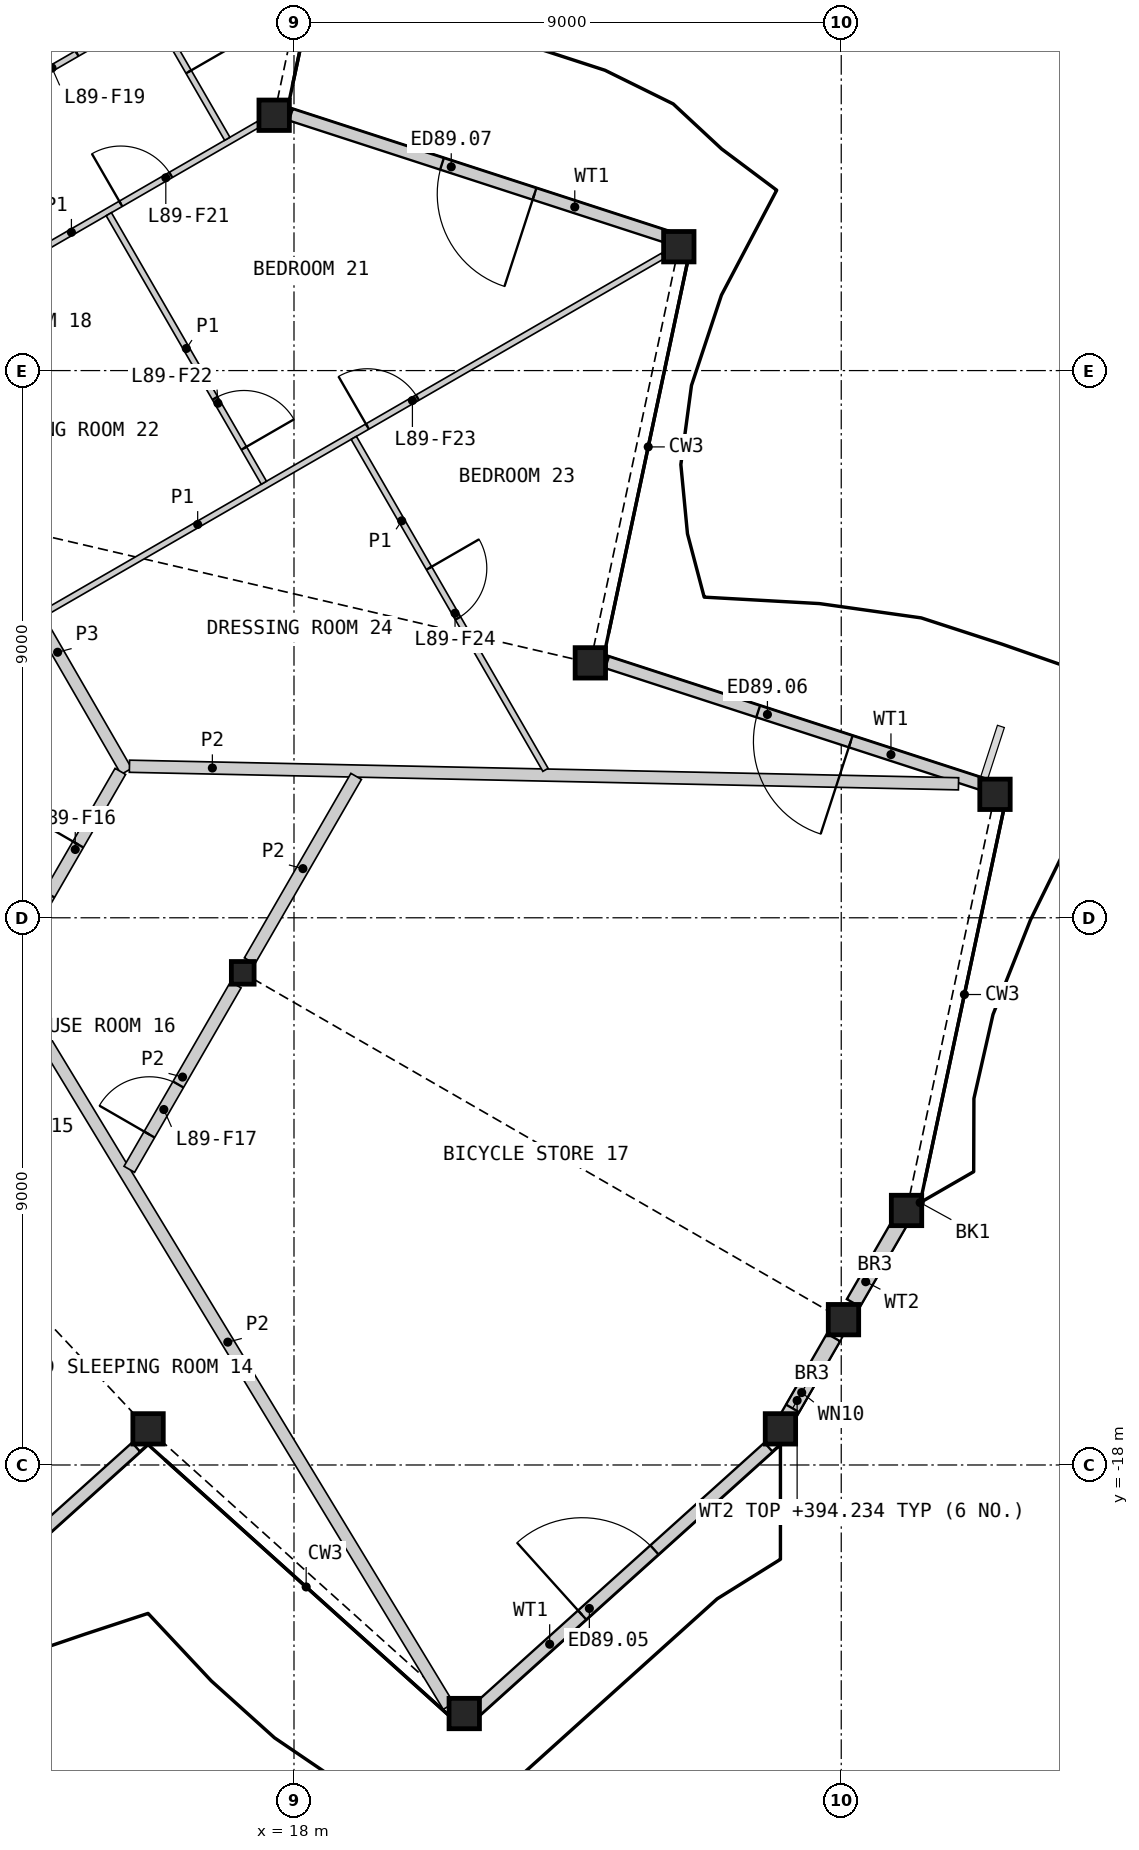
"""IFC4 building model, lengths in metres.
Left out: names, types, materials, properties, quantities, classifications, styles, units other than length and angle.
Written with IfcOpenShell. Run it as: python <this file> out.ifc"""

import sys

from ifc_helpers import new_model, si_unit, direction, frame, frame_2d, origin, origin_2d, place, context, subcontext, project, spatial, rectangle, hollow_rectangle, i_section, extrude, element, fill, save


model = new_model("IFC4")
c1 = context("Model", 3, precision=1e-05, world=origin(), true_north=direction((0.0, 1.0)))
c2 = subcontext(c1, "Body", "Model", "MODEL_VIEW")
j1 = project(units=[si_unit("LENGTHUNIT", "METRE"), si_unit("PLANEANGLEUNIT", "RADIAN")], contexts=[c1])
p1 = place(None, origin())
s1 = spatial("IfcSite", under=j1, at=p1, CompositionType="ELEMENT")
p2 = place(p1, origin())
s2 = spatial("IfcBuilding", under=s1, at=p2, CompositionType="ELEMENT")
p3 = place(p2, frame((0.0, 0.0, 391.6)))
s3 = spatial("IfcBuildingStorey", under=s2, at=p3, CompositionType="ELEMENT", Elevation=391.6)
for number, where, z_axis, x_axis in (
    (1, (15.6, -17.406, 0.0), (0.0, 0.0, 1.0), (1.0, 0.0, 0.0)),
    (2, (20.8, -22.088, 0.0), (0.0, 0.0, 1.0), (1.0, 0.0, 0.0)),
    (3, (26.0, -17.406, 0.0), (0.0, 0.0, 1.0), (1.0, 0.0, 0.0)),
    (4, (27.037, -15.61, 0.0), (0.0, 0.0, 1.0), (1.0, 0.0, 0.0)),
    (5, (28.074, -13.814, 0.0), (0.0, 0.0, 1.0), (1.0, 0.0, 0.0)),
    (6, (29.529, -6.969, 0.0), (0.0, 0.0, 1.0), (1.0, 0.0, 0.0)),
    (7, (22.874, -4.807, 0.0), (0.0, 0.0, 1.0), (1.0, 0.0, 0.0)),
    (8, (24.329, 2.037, 0.0), (0.0, 0.0, 1.0), (1.0, 0.0, 0.0)),
    (9, (17.674, 4.199, 0.0), (0.0, 0.0, 1.0), (1.0, 0.0, 0.0)),
):
    element("IfcColumn", number, at=place(p3, frame(where, z_axis=z_axis, x_axis=x_axis)), inside=s3, PredefinedType="COLUMN", context=c2, shape_type="SweptSolid", body=[
        extrude(hollow_rectangle(XDim=0.5, YDim=0.5, WallThickness=0.03, at=origin_2d()), origin(), (0.0, 0.0, 1.0), 3.4),
    ])
p4 = place(p3, frame((17.157, -9.906, 0.0), z_axis=(0.0, 0.0, 1.0), x_axis=(1.0, 0.0, 0.0)))
e10 = element("IfcColumn", 10, at=p4, inside=s3, PredefinedType="COLUMN", context=c2, shape_type="SweptSolid", body=[
    extrude(i_section(OverallWidth=0.374, OverallDepth=0.372, WebThickness=0.016, FlangeThickness=0.026, at=origin_2d()), origin(), (0.0, 0.0, 1.0), 3.4),
])
p5 = place(p3, frame((10.605, -22.028, 0.0), z_axis=(0.0, 0.0, 1.0), x_axis=(0.743153126052, 0.669121387522, 0.0)))
e11 = element("IfcWall", 11, at=p5, inside=s3, PredefinedType="SOLIDWALL", context=c2, shape_type="SweptSolid", body=[
    extrude(rectangle(XDim=6.457, YDim=0.2, at=frame_2d((3.229, 0.0))), origin(), (0.0, 0.0, 1.0), 2.634),
])
p6 = place(p5, frame((2.333, 0.0, 0.0)))
e12 = element("IfcOpeningElement", 12, at=p6, cuts=e11, PredefinedType="OPENING", context=c2, shape_type="SweptSolid", body=[
    extrude(rectangle(XDim=1.6, YDim=2.25, at=frame_2d((0.8, 1.125))), frame((0.0, 0.11, 0.0), z_axis=(0.0, -1.0, 0.0), x_axis=(1.0, 0.0, 0.0)), (0.0, 0.0, 1.0), 0.22),
])
p7 = place(p3, frame((21.005, -22.028, 0.0), z_axis=(0.0, 0.0, 1.0), x_axis=(0.743136196971, 0.669140189162, 0.0)))
e13 = element("IfcWall", 13, at=p7, inside=s3, PredefinedType="SOLIDWALL", context=c2, shape_type="SweptSolid", body=[
    extrude(rectangle(XDim=6.457, YDim=0.2, at=frame_2d((3.229, 0.0))), origin(), (0.0, 0.0, 1.0), 2.634),
])
p8 = place(p7, frame((2.333, 0.0, 0.0)))
e14 = element("IfcOpeningElement", 14, at=p8, cuts=e13, PredefinedType="OPENING", context=c2, shape_type="SweptSolid", body=[
    extrude(rectangle(XDim=1.6, YDim=2.25, at=frame_2d((0.8, 1.125))), frame((0.0, 0.11, 0.0), z_axis=(0.0, -1.0, 0.0), x_axis=(1.0, 0.0, 0.0)), (0.0, 0.0, 1.0), 0.22),
])
p9 = place(p3, frame((26.075, -17.285, 0.0), z_axis=(0.0, 0.0, 1.0), x_axis=(0.500017882314, 0.866015079179, 0.0)))
e15 = element("IfcWall", 15, at=p9, inside=s3, PredefinedType="SOLIDWALL", context=c2, shape_type="SweptSolid", body=[
    extrude(rectangle(XDim=1.598, YDim=0.25, at=frame_2d((0.799, 0.0))), origin(), (0.0, 0.0, 1.0), 2.634),
])
p10 = place(p9, frame((0.25, 0.0, 0.4)))
e16 = element("IfcOpeningElement", 16, at=p10, cuts=e15, PredefinedType="OPENING", context=c2, shape_type="SweptSolid", body=[
    extrude(rectangle(XDim=0.6, YDim=0.6, at=frame_2d((0.3, 0.3))), frame((0.0, 0.135, 0.0), z_axis=(0.0, -1.0, 0.0), x_axis=(1.0, 0.0, 0.0)), (0.0, 0.0, 1.0), 0.27),
])
p11 = place(p3, frame((27.201, -15.335, 0.0), z_axis=(0.0, 0.0, 1.0), x_axis=(0.499967189098, 0.866044346339, 0.0)))
e17 = element("IfcWall", 17, at=p11, inside=s3, PredefinedType="SOLIDWALL", context=c2, shape_type="SweptSolid", body=[
    extrude(rectangle(XDim=1.612, YDim=0.25, at=frame_2d((0.806, 0.0))), origin(), (0.0, 0.0, 1.0), 2.634),
])
p12 = place(p3, frame((29.374, -6.822, 0.0), z_axis=(0.0, 0.0, 1.0), x_axis=(-0.951061473407, 0.309001737536, 0.0)))
e18 = element("IfcWall", 18, at=p12, inside=s3, PredefinedType="SOLIDWALL", context=c2, shape_type="SweptSolid", body=[
    extrude(rectangle(XDim=6.546, YDim=0.2, at=frame_2d((3.273, 0.0))), origin(), (0.0, 0.0, 1.0), 2.634),
])
p13 = place(p12, frame((2.333, 0.0, 0.0)))
e19 = element("IfcOpeningElement", 19, at=p13, cuts=e18, PredefinedType="OPENING", context=c2, shape_type="SweptSolid", body=[
    extrude(rectangle(XDim=1.6, YDim=2.25, at=frame_2d((0.8, 1.125))), frame((0.0, 0.11, 0.0), z_axis=(0.0, -1.0, 0.0), x_axis=(1.0, 0.0, 0.0)), (0.0, 0.0, 1.0), 0.22),
])
p14 = place(p3, frame((24.174, 2.185, 0.0), z_axis=(0.0, 0.0, 1.0), x_axis=(-0.951061473407, 0.309001737536, 0.0)))
e20 = element("IfcWall", 20, at=p14, inside=s3, PredefinedType="SOLIDWALL", context=c2, shape_type="SweptSolid", body=[
    extrude(rectangle(XDim=6.546, YDim=0.2, at=frame_2d((3.273, 0.0))), origin(), (0.0, 0.0, 1.0), 2.634),
])
p15 = place(p14, frame((2.333, 0.0, 0.0)))
e21 = element("IfcOpeningElement", 21, at=p15, cuts=e20, PredefinedType="OPENING", context=c2, shape_type="SweptSolid", body=[
    extrude(rectangle(XDim=1.6, YDim=2.25, at=frame_2d((0.8, 1.125))), frame((0.0, 0.11, 0.0), z_axis=(0.0, -1.0, 0.0), x_axis=(1.0, 0.0, 0.0)), (0.0, 0.0, 1.0), 0.22),
])
p16 = place(p3, frame((12.981, -2.673, 0.0), z_axis=(0.0, 0.0, 1.0), x_axis=(0.499974648164, -0.866040040179, 0.0)))
e22 = element("IfcWall", 22, at=p16, inside=s3, PredefinedType="PARTITIONING", context=c2, shape_type="SweptSolid", body=[
    extrude(rectangle(XDim=4.525, YDim=0.2, at=frame_2d((2.263, 0.0))), origin(), (0.0, 0.0, 1.0), 3.1),
])
p17 = place(p3, frame((13.281, -9.819, 0.0), z_axis=(0.0, 0.0, 1.0), x_axis=(0.499958791762, 0.866049194065, 0.0)))
e23 = element("IfcWall", 23, at=p17, inside=s3, PredefinedType="PARTITIONING", context=c2, shape_type="SweptSolid", body=[
    extrude(rectangle(XDim=3.726, YDim=0.2, at=frame_2d((1.863, 0.0))), origin(), (0.0, 0.0, 1.0), 3.1),
])
p18 = place(p17, frame((1.388, 0.0, 0.0)))
e24 = element("IfcOpeningElement", 24, at=p18, cuts=e23, PredefinedType="OPENING", context=c2, shape_type="SweptSolid", body=[
    extrude(rectangle(XDim=0.95, YDim=2.1, at=frame_2d((0.475, 1.05))), frame((0.0, 0.11, 0.0), z_axis=(0.0, -1.0, 0.0), x_axis=(1.0, 0.0, 0.0)), (0.0, 0.0, 1.0), 0.22),
])
p19 = place(p3, frame((13.283, -9.991, 0.0), z_axis=(0.0, 0.0, 1.0), x_axis=(0.518239121386, -0.855235764608, 0.0)))
e25 = element("IfcWall", 25, at=p19, inside=s3, PredefinedType="PARTITIONING", context=c2, shape_type="SweptSolid", body=[
    extrude(rectangle(XDim=14.004, YDim=0.2, at=frame_2d((7.002, 0.0))), origin(), (0.0, 0.0, 1.0), 2.33),
])
p20 = place(p3, frame((15.294, -6.508, 0.0), z_axis=(0.0, 0.0, 1.0), x_axis=(0.999775726416, -0.02117774467, 0.0)))
e26 = element("IfcWall", 26, at=p20, inside=s3, PredefinedType="PARTITIONING", context=c2, shape_type="SweptSolid", body=[
    extrude(rectangle(XDim=13.638, YDim=0.2, at=frame_2d((6.819, 0.0))), origin(), (0.0, 0.0, 1.0), 2.33),
])
p21 = place(p3, frame((15.291, -13.137, 0.0), z_axis=(0.0, 0.0, 1.0), x_axis=(0.500005931509, 0.866021979199, 0.0)))
e27 = element("IfcWall", 27, at=p21, inside=s3, PredefinedType="PARTITIONING", context=c2, shape_type="SweptSolid", body=[
    extrude(rectangle(XDim=3.504, YDim=0.2, at=frame_2d((1.752, 0.0))), origin(), (0.0, 0.0, 1.0), 2.33),
])
p22 = place(p21, frame((0.661, 0.0, 0.0)))
e28 = element("IfcOpeningElement", 28, at=p22, cuts=e27, PredefinedType="OPENING", context=c2, shape_type="SweptSolid", body=[
    extrude(rectangle(XDim=0.95, YDim=2.1, at=frame_2d((0.475, 1.05))), frame((0.0, 0.11, 0.0), z_axis=(0.0, -1.0, 0.0), x_axis=(1.0, 0.0, 0.0)), (0.0, 0.0, 1.0), 0.22),
])
p23 = place(p3, frame((17.271, -9.708, 0.0), z_axis=(0.0, 0.0, 1.0), x_axis=(0.499983843005, 0.866034731829, 0.0)))
e29 = element("IfcWall", 29, at=p23, inside=s3, PredefinedType="PARTITIONING", context=c2, shape_type="SweptSolid", body=[
    extrude(rectangle(XDim=3.503, YDim=0.2, at=frame_2d((1.752, 0.0))), origin(), (0.0, 0.0, 1.0), 2.33),
])
p24 = place(p3, frame((13.865, -4.004, 0.0), z_axis=(0.0, 0.0, 1.0), x_axis=(0.866023404247, 0.500003463284, 0.0)))
e30 = element("IfcWall", 30, at=p24, inside=s3, PredefinedType="PARTITIONING", context=c2, shape_type="SweptSolid", body=[
    extrude(rectangle(XDim=11.782, YDim=0.1, at=frame_2d((5.891, 0.0))), origin(), (0.0, 0.0, 1.0), 2.33),
])
p25 = place(p24, frame((6.168, 0.0, 0.0)))
e31 = element("IfcOpeningElement", 31, at=p25, cuts=e30, PredefinedType="OPENING", context=c2, shape_type="SweptSolid", body=[
    extrude(rectangle(XDim=0.95, YDim=2.1, at=frame_2d((0.475, 1.05))), frame((0.0, 0.06, 0.0), z_axis=(0.0, -1.0, 0.0), x_axis=(1.0, 0.0, 0.0)), (0.0, 0.0, 1.0), 0.12),
])
p26 = place(p3, frame((11.265, 0.5, 0.0), z_axis=(0.0, 0.0, 1.0), x_axis=(0.866033839264, 0.499985389037, 0.0)))
e32 = element("IfcWall", 32, at=p26, inside=s3, PredefinedType="PARTITIONING", context=c2, shape_type="SweptSolid", body=[
    extrude(rectangle(XDim=7.1, YDim=0.1, at=frame_2d((3.55, 0.0))), origin(), (0.0, 0.0, 1.0), 2.33),
])
p27 = place(p26, frame((4.488, 0.0, 0.0)))
e33 = element("IfcOpeningElement", 33, at=p27, cuts=e32, PredefinedType="OPENING", context=c2, shape_type="SweptSolid", body=[
    extrude(rectangle(XDim=0.95, YDim=2.1, at=frame_2d((0.475, 1.05))), frame((0.0, 0.06, 0.0), z_axis=(0.0, -1.0, 0.0), x_axis=(1.0, 0.0, 0.0)), (0.0, 0.0, 1.0), 0.12),
])
p28 = place(p3, frame((18.983, -1.107, 0.0), z_axis=(0.0, 0.0, 1.0), x_axis=(0.500016298831, -0.866015993445, 0.0)))
e34 = element("IfcWall", 34, at=p28, inside=s3, PredefinedType="PARTITIONING", context=c2, shape_type="SweptSolid", body=[
    extrude(rectangle(XDim=6.305, YDim=0.1, at=frame_2d((3.152, 0.0))), origin(), (0.0, 0.0, 1.0), 2.33),
])
p29 = place(p28, frame((2.475, 0.0, 0.0)))
e35 = element("IfcOpeningElement", 35, at=p29, cuts=e34, PredefinedType="OPENING", context=c2, shape_type="SweptSolid", body=[
    extrude(rectangle(XDim=0.95, YDim=2.1, at=frame_2d((0.475, 1.05))), frame((0.0, 0.06, 0.0), z_axis=(0.0, -1.0, 0.0), x_axis=(1.0, 0.0, 0.0)), (0.0, 0.0, 1.0), 0.12),
])
p30 = place(p3, frame((14.39, 8.164, 0.0), z_axis=(0.0, 0.0, 1.0), x_axis=(0.499990214365, -0.86603105345, 0.0)))
e36 = element("IfcWall", 36, at=p30, inside=s3, PredefinedType="PARTITIONING", context=c2, shape_type="SweptSolid", body=[
    extrude(rectangle(XDim=5.025, YDim=0.1, at=frame_2d((2.512, 0.0))), origin(), (0.0, 0.0, 1.0), 2.33),
])
p31 = place(p30, frame((2.803, 0.0, 0.0)))
e37 = element("IfcOpeningElement", 37, at=p31, cuts=e36, PredefinedType="OPENING", context=c2, shape_type="SweptSolid", body=[
    extrude(rectangle(XDim=0.95, YDim=2.1, at=frame_2d((0.475, 1.05))), frame((0.0, 0.06, 0.0), z_axis=(0.0, -1.0, 0.0), x_axis=(1.0, 0.0, 0.0)), (0.0, 0.0, 1.0), 0.12),
])
p32 = place(p3, frame((14.954, 2.572, 0.0), z_axis=(0.0, 0.0, 1.0), x_axis=(0.499984882974, -0.866034131428, 0.0)))
e38 = element("IfcWall", 38, at=p32, inside=s3, PredefinedType="PARTITIONING", context=c2, shape_type="SweptSolid", body=[
    extrude(rectangle(XDim=5.1, YDim=0.1, at=frame_2d((2.55, 0.0))), origin(), (0.0, 0.0, 1.0), 2.33),
])
p33 = place(p32, frame((3.494, 0.0, 0.0)))
e39 = element("IfcOpeningElement", 39, at=p33, cuts=e38, PredefinedType="OPENING", context=c2, shape_type="SweptSolid", body=[
    extrude(rectangle(XDim=0.95, YDim=2.1, at=frame_2d((0.475, 1.05))), frame((0.0, 0.06, 0.0), z_axis=(0.0, -1.0, 0.0), x_axis=(1.0, 0.0, 0.0)), (0.0, 0.0, 1.0), 0.12),
])
p34 = place(p3, frame((12.31, 3.99, 0.0), z_axis=(0.0, 0.0, 1.0), x_axis=(0.86599734893, 0.500048589285, 0.0)))
e40 = element("IfcWall", 40, at=p34, inside=s3, PredefinedType="PARTITIONING", context=c2, shape_type="SweptSolid", body=[
    extrude(rectangle(XDim=2.7, YDim=0.1, at=frame_2d((1.35, 0.0))), origin(), (0.0, 0.0, 1.0), 2.33),
])
p35 = place(p34, frame((1.5, 0.0, 0.0)))
e41 = element("IfcOpeningElement", 41, at=p35, cuts=e40, PredefinedType="OPENING", context=c2, shape_type="SweptSolid", body=[
    extrude(rectangle(XDim=0.95, YDim=2.1, at=frame_2d((0.475, 1.05))), frame((0.0, 0.06, 0.0), z_axis=(0.0, -1.0, 0.0), x_axis=(1.0, 0.0, 0.0)), (0.0, 0.0, 1.0), 0.12),
])
p36 = place(p8, origin())
e42 = element("IfcDoor", 42, at=p36, inside=s3, OperationType="DOUBLE_DOOR_SINGLE_SWING", PredefinedType="DOOR", context=c2, shape_type="SweptSolid", body=[
    extrude(rectangle(XDim=1.6, YDim=2.25, at=frame_2d((0.8, 1.125))), frame((0.0, 0.025, 0.0), z_axis=(0.0, -1.0, 0.0), x_axis=(1.0, 0.0, 0.0)), (0.0, 0.0, 1.0), 0.05),
])
fill(e14, e42)
p37 = place(p10, origin())
e43 = element("IfcWindow", 43, at=p37, inside=s3, PartitioningType="SINGLE_PANEL", PredefinedType="WINDOW", context=c2, shape_type="SweptSolid", body=[
    extrude(rectangle(XDim=0.6, YDim=0.6, at=frame_2d((0.3, 0.3))), frame((0.0, 0.03, 0.0), z_axis=(0.0, -1.0, 0.0), x_axis=(1.0, 0.0, 0.0)), (0.0, 0.0, 1.0), 0.06),
])
fill(e16, e43)
p38 = place(p13, origin())
e44 = element("IfcDoor", 44, at=p38, inside=s3, OperationType="DOUBLE_DOOR_SINGLE_SWING", PredefinedType="DOOR", context=c2, shape_type="SweptSolid", body=[
    extrude(rectangle(XDim=1.6, YDim=2.25, at=frame_2d((0.8, 1.125))), frame((0.0, 0.025, 0.0), z_axis=(0.0, -1.0, 0.0), x_axis=(1.0, 0.0, 0.0)), (0.0, 0.0, 1.0), 0.05),
])
fill(e19, e44)
p39 = place(p15, origin())
e45 = element("IfcDoor", 45, at=p39, inside=s3, OperationType="DOUBLE_DOOR_SINGLE_SWING", PredefinedType="DOOR", context=c2, shape_type="SweptSolid", body=[
    extrude(rectangle(XDim=1.6, YDim=2.25, at=frame_2d((0.8, 1.125))), frame((0.0, 0.025, 0.0), z_axis=(0.0, -1.0, 0.0), x_axis=(1.0, 0.0, 0.0)), (0.0, 0.0, 1.0), 0.05),
])
fill(e21, e45)
p40 = place(p18, origin())
e46 = element("IfcDoor", 46, at=p40, inside=s3, OperationType="SINGLE_SWING_RIGHT", PredefinedType="DOOR", context=c2, shape_type="SweptSolid", body=[
    extrude(rectangle(XDim=0.95, YDim=2.1, at=frame_2d((0.475, 1.05))), frame((0.0, 0.025, 0.0), z_axis=(0.0, -1.0, 0.0), x_axis=(1.0, 0.0, 0.0)), (0.0, 0.0, 1.0), 0.05),
])
fill(e24, e46)
p41 = place(p22, origin())
e47 = element("IfcDoor", 47, at=p41, inside=s3, OperationType="SINGLE_SWING_LEFT", PredefinedType="DOOR", context=c2, shape_type="SweptSolid", body=[
    extrude(rectangle(XDim=0.95, YDim=2.1, at=frame_2d((0.475, 1.05))), frame((0.0, 0.025, 0.0), z_axis=(0.0, -1.0, 0.0), x_axis=(1.0, 0.0, 0.0)), (0.0, 0.0, 1.0), 0.05),
])
fill(e28, e47)
p42 = place(p35, origin())
e48 = element("IfcDoor", 48, at=p42, inside=s3, OperationType="SINGLE_SWING_RIGHT", PredefinedType="DOOR", context=c2, shape_type="SweptSolid", body=[
    extrude(rectangle(XDim=0.95, YDim=2.1, at=frame_2d((0.475, 1.05))), frame((0.0, 0.025, 0.0), z_axis=(0.0, -1.0, 0.0), x_axis=(1.0, 0.0, 0.0)), (0.0, 0.0, 1.0), 0.05),
])
fill(e41, e48)
p43 = place(p31, origin())
e49 = element("IfcDoor", 49, at=p43, inside=s3, OperationType="SINGLE_SWING_RIGHT", PredefinedType="DOOR", context=c2, shape_type="SweptSolid", body=[
    extrude(rectangle(XDim=0.95, YDim=2.1, at=frame_2d((0.475, 1.05))), frame((0.0, 0.025, 0.0), z_axis=(0.0, -1.0, 0.0), x_axis=(1.0, 0.0, 0.0)), (0.0, 0.0, 1.0), 0.05),
])
fill(e37, e49)
p44 = place(p27, origin())
e50 = element("IfcDoor", 50, at=p44, inside=s3, OperationType="SINGLE_SWING_LEFT", PredefinedType="DOOR", context=c2, shape_type="SweptSolid", body=[
    extrude(rectangle(XDim=0.95, YDim=2.1, at=frame_2d((0.475, 1.05))), frame((0.0, 0.025, 0.0), z_axis=(0.0, -1.0, 0.0), x_axis=(1.0, 0.0, 0.0)), (0.0, 0.0, 1.0), 0.05),
])
fill(e33, e50)
p45 = place(p33, origin())
e51 = element("IfcDoor", 51, at=p45, inside=s3, OperationType="SINGLE_SWING_RIGHT", PredefinedType="DOOR", context=c2, shape_type="SweptSolid", body=[
    extrude(rectangle(XDim=0.95, YDim=2.1, at=frame_2d((0.475, 1.05))), frame((0.0, 0.025, 0.0), z_axis=(0.0, -1.0, 0.0), x_axis=(1.0, 0.0, 0.0)), (0.0, 0.0, 1.0), 0.05),
])
fill(e39, e51)
p46 = place(p25, origin())
e52 = element("IfcDoor", 52, at=p46, inside=s3, OperationType="SINGLE_SWING_LEFT", PredefinedType="DOOR", context=c2, shape_type="SweptSolid", body=[
    extrude(rectangle(XDim=0.95, YDim=2.1, at=frame_2d((0.475, 1.05))), frame((0.0, 0.025, 0.0), z_axis=(0.0, -1.0, 0.0), x_axis=(1.0, 0.0, 0.0)), (0.0, 0.0, 1.0), 0.05),
])
fill(e31, e52)
p47 = place(p29, origin())
e53 = element("IfcDoor", 53, at=p47, inside=s3, OperationType="SINGLE_SWING_LEFT", PredefinedType="DOOR", context=c2, shape_type="SweptSolid", body=[
    extrude(rectangle(XDim=0.95, YDim=2.1, at=frame_2d((0.475, 1.05))), frame((0.0, 0.025, 0.0), z_axis=(0.0, -1.0, 0.0), x_axis=(1.0, 0.0, 0.0)), (0.0, 0.0, 1.0), 0.05),
])
fill(e35, e53)
save(model, sys.argv[1])
